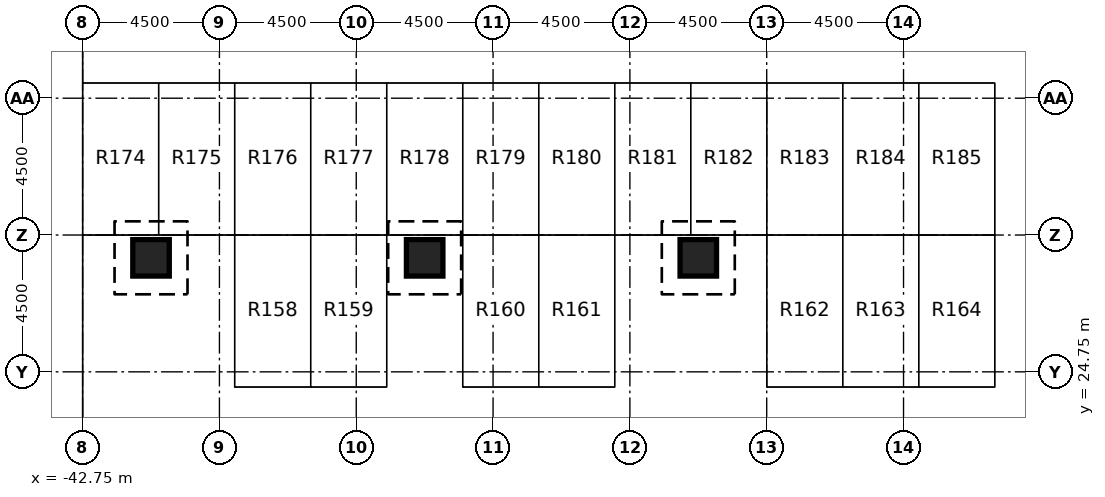
"""IFC4 building model, lengths in metres.
Left out: names, types, materials, properties, quantities, classifications, styles, units other than length and angle.
Written with IfcOpenShell. Run it as: python <this file> out.ifc"""

import sys

from ifc_helpers import new_model, si_unit, direction, frame, origin, origin_2d, place, context, subcontext, project, spatial, rectangle, extrude, element, save


model = new_model("IFC4")
c1 = context("Model", 3, precision=1e-05, world=origin(), true_north=direction((0.0, 1.0)))
c2 = subcontext(c1, "Body", "Model", "MODEL_VIEW")
j1 = project(units=[si_unit("LENGTHUNIT", "METRE"), si_unit("PLANEANGLEUNIT", "RADIAN")], contexts=[c1])
p1 = place(None, origin())
s1 = spatial("IfcSite", under=j1, at=p1, CompositionType="ELEMENT")
p2 = place(p1, origin())
s2 = spatial("IfcBuilding", under=s1, at=p2, CompositionType="ELEMENT")
p3 = place(p2, frame((0.0, 0.0, -8.0)))
s3 = spatial("IfcBuildingStorey", under=s2, at=p3, CompositionType="ELEMENT", Elevation=-8.0)
for number, where, z_axis, x_axis in (
    (1, (-40.5, 28.5, 0.0), (0.0, 0.0, 1.0), (1.0, 0.0, 0.0)),
    (2, (-31.5, 28.5, 0.0), (0.0, 0.0, 1.0), (1.0, 0.0, 0.0)),
    (3, (-22.5, 28.5, 0.0), (0.0, 0.0, 1.0), (1.0, 0.0, 0.0)),
):
    element("IfcColumn", number, at=place(p3, frame(where, z_axis=z_axis, x_axis=x_axis)), inside=s3, PredefinedType="COLUMN", context=c2, shape_type="SweptSolid", body=[
        extrude(rectangle(XDim=1.2, YDim=1.2, at=origin_2d()), origin(), (0.0, 0.0, 1.0), 3.4),
    ])
save(model, sys.argv[1])
